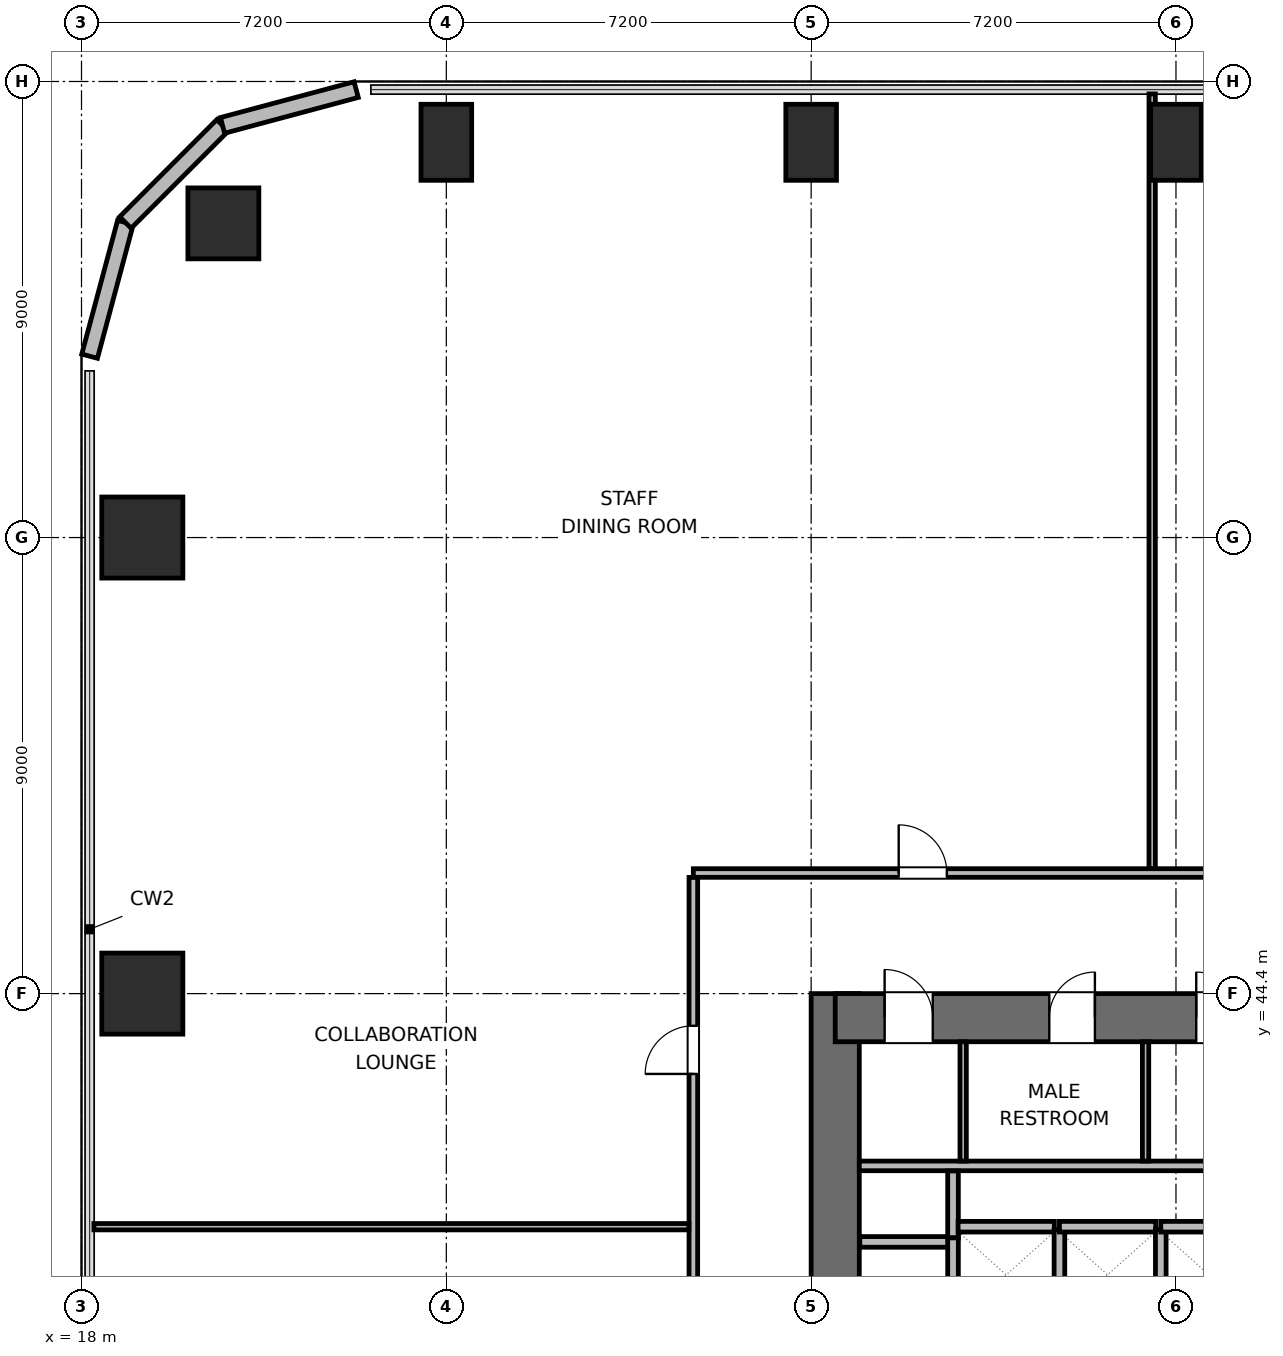
"""IFC4 building model, lengths in metres.
Left out: names, types, materials, properties, quantities, classifications, styles, units other than length and angle.
Written with IfcOpenShell. Run it as: python <this file> out.ifc"""

import sys

from ifc_helpers import new_model, si_unit, direction, frame, frame_2d, origin, origin_2d, place, context, subcontext, project, spatial, rectangle, circle, extrude, element, fill, save


model = new_model("IFC4")
c1 = context("Model", 3, precision=1e-05, world=origin(), true_north=direction((0.0, 1.0)))
c2 = subcontext(c1, "Body", "Model", "MODEL_VIEW")
j1 = project(units=[si_unit("LENGTHUNIT", "METRE"), si_unit("PLANEANGLEUNIT", "RADIAN")], contexts=[c1])
p1 = place(None, origin())
s1 = spatial("IfcSite", under=j1, at=p1, CompositionType="ELEMENT")
p2 = place(p1, origin())
s2 = spatial("IfcBuilding", under=s1, at=p2, CompositionType="ELEMENT")
p3 = place(p2, frame((0.0, 0.0, 41.1)))
s3 = spatial("IfcBuildingStorey", under=s2, at=p3, CompositionType="ELEMENT", Elevation=41.1)
p4 = place(p3, frame((32.875, 27.6, 0.0), z_axis=(0.0, 0.0, 1.0), x_axis=(0.0, 1.0, 0.0)))
e1 = element("IfcWall", 1, at=p4, inside=s3, PredefinedType="SHEAR", context=c2, shape_type="SweptSolid", body=[
    extrude(rectangle(XDim=16.8, YDim=0.95, at=frame_2d((8.4, 0.0))), origin(), (0.0, 0.0, 1.0), 3.9),
])
p5 = place(p3, frame((32.875, 43.925, 0.0), z_axis=(0.0, 0.0, 1.0), x_axis=(1.0, 0.0, 0.0)))
e2 = element("IfcWall", 2, at=p5, inside=s3, PredefinedType="SHEAR", context=c2, shape_type="SweptSolid", body=[
    extrude(rectangle(XDim=9.05, YDim=0.95, at=frame_2d((4.525, 0.0))), origin(), (0.0, 0.0, 1.0), 3.9),
])
p6 = place(p5, frame((0.975, 0.0, 0.0)))
e3 = element("IfcOpeningElement", 3, at=p6, cuts=e2, PredefinedType="OPENING", context=c2, shape_type="SweptSolid", body=[
    extrude(rectangle(XDim=0.95, YDim=2.04, at=frame_2d((0.475, 1.02))), frame((0.0, 0.485, 0.0), z_axis=(0.0, -1.0, 0.0), x_axis=(1.0, 0.0, 0.0)), (0.0, 0.0, 1.0), 0.97),
])
p7 = place(p5, frame((4.225, 0.0, 0.0)))
e4 = element("IfcOpeningElement", 4, at=p7, cuts=e2, PredefinedType="OPENING", context=c2, shape_type="SweptSolid", body=[
    extrude(rectangle(XDim=0.9, YDim=2.02, at=frame_2d((0.45, 1.01))), frame((0.0, 0.485, 0.0), z_axis=(0.0, -1.0, 0.0), x_axis=(1.0, 0.0, 0.0)), (0.0, 0.0, 1.0), 0.97),
])
p8 = place(p5, frame((7.125, 0.0, 0.0)))
e5 = element("IfcOpeningElement", 5, at=p8, cuts=e2, PredefinedType="OPENING", context=c2, shape_type="SweptSolid", body=[
    extrude(rectangle(XDim=0.9, YDim=2.02, at=frame_2d((0.45, 1.01))), frame((0.0, 0.485, 0.0), z_axis=(0.0, -1.0, 0.0), x_axis=(1.0, 0.0, 0.0)), (0.0, 0.0, 1.0), 0.97),
])
p9 = place(p3, frame((20.8, 59.6, 0.0), z_axis=(0.0, 0.0, 1.0), x_axis=(1.0, 0.0, 0.0)))
e6 = element("IfcColumn", 6, at=p9, inside=s3, PredefinedType="COLUMN", context=c2, shape_type="SweptSolid", body=[
    extrude(circle(Radius=0.7, at=origin_2d()), origin(), (0.0, 0.0, 1.0), 3.9),
])
for number, where, z_axis, x_axis in (
    (7, (25.2, 61.2, 0.0), (0.0, 0.0, 1.0), (1.0, 0.0, 0.0)),
    (8, (32.4, 61.2, 0.0), (0.0, 0.0, 1.0), (1.0, 0.0, 0.0)),
    (9, (39.6, 61.2, 0.0), (0.0, 0.0, 1.0), (1.0, 0.0, 0.0)),
):
    element("IfcColumn", number, at=place(p3, frame(where, z_axis=z_axis, x_axis=x_axis)), inside=s3, PredefinedType="COLUMN", context=c2, shape_type="SweptSolid", body=[
        extrude(rectangle(XDim=1.0, YDim=1.5, at=origin_2d()), origin(), (0.0, 0.0, 1.0), 3.9),
    ])
for number, where, z_axis, x_axis in (
    (10, (19.2, 44.4, 0.0), (0.0, 0.0, 1.0), (1.0, 0.0, 0.0)),
    (11, (19.2, 53.4, 0.0), (0.0, 0.0, 1.0), (1.0, 0.0, 0.0)),
):
    element("IfcColumn", number, at=place(p3, frame(where, z_axis=z_axis, x_axis=x_axis)), inside=s3, PredefinedType="COLUMN", context=c2, shape_type="SweptSolid", body=[
        extrude(rectangle(XDim=1.6, YDim=1.6, at=origin_2d()), origin(), (0.0, 0.0, 1.0), 3.9),
    ])
p10 = place(p3, frame((18.16, 56.979, 0.0), z_axis=(0.0, 0.0, 1.0), x_axis=(0.25869736047, 0.965958423373, 0.0)))
e12 = element("IfcWall", 12, at=p10, inside=s3, PredefinedType="SOLIDWALL", context=c2, shape_type="SweptSolid", body=[
    extrude(rectangle(XDim=2.731, YDim=0.32, at=frame_2d((1.366, 0.0))), origin(), (0.0, 0.0, 1.0), 3.64),
])
p11 = place(p3, frame((18.866, 59.617, 0.0), z_axis=(0.0, 0.0, 1.0), x_axis=(0.707106781187, 0.707106781187, 0.0)))
e13 = element("IfcWall", 13, at=p11, inside=s3, PredefinedType="SOLIDWALL", context=c2, shape_type="SweptSolid", body=[
    extrude(rectangle(XDim=2.71, YDim=0.32, at=frame_2d((1.355, 0.0))), origin(), (0.0, 0.0, 1.0), 3.64),
])
p12 = place(p3, frame((20.783, 61.533, 0.0), z_axis=(0.0, 0.0, 1.0), x_axis=(0.965964405026, 0.25867502435, 0.0)))
e14 = element("IfcWall", 14, at=p12, inside=s3, PredefinedType="SOLIDWALL", context=c2, shape_type="SweptSolid", body=[
    extrude(rectangle(XDim=2.731, YDim=0.32, at=frame_2d((1.366, 0.0))), origin(), (0.0, 0.0, 1.0), 3.64),
])
p13 = place(p3, frame((33.35, 41.0, 0.0), z_axis=(0.0, 0.0, 1.0), x_axis=(1.0, 0.0, 0.0)))
e15 = element("IfcWall", 15, at=p13, inside=s3, PredefinedType="PLUMBINGWALL", context=c2, shape_type="SweptSolid", body=[
    extrude(rectangle(XDim=8.1, YDim=0.19, at=frame_2d((4.05, 0.0))), origin(), (0.0, 0.0, 1.0), 3.64),
])
for number, where, z_axis, x_axis in (
    (16, (35.4, 41.095, 0.0), (0.0, 0.0, 1.0), (0.0, 1.0, 0.0)),
    (17, (39.0, 41.095, 0.0), (0.0, 0.0, 1.0), (0.0, 1.0, 0.0)),
):
    element("IfcWall", number, at=place(p3, frame(where, z_axis=z_axis, x_axis=x_axis)), inside=s3, PredefinedType="PARTITIONING", context=c2, shape_type="SweptSolid", body=[
        extrude(rectangle(XDim=2.355, YDim=0.125, at=frame_2d((1.177, 0.0))), origin(), (0.0, 0.0, 1.0), 3.64),
    ])
p14 = place(p3, frame((33.36, 39.5, 0.0), z_axis=(0.0, 0.0, 1.0), x_axis=(1.0, 0.0, 0.0)))
e18 = element("IfcWall", 18, at=p14, inside=s3, PredefinedType="PARTITIONING", context=c2, shape_type="SweptSolid", body=[
    extrude(rectangle(XDim=1.86, YDim=0.21, at=frame_2d((0.93, 0.0))), origin(), (0.0, 0.0, 1.0), 3.64),
])
p15 = place(p3, frame((35.2, 39.58, 0.0), z_axis=(0.0, 0.0, 1.0), x_axis=(0.0, 1.0, 0.0)))
e19 = element("IfcWall", 19, at=p15, inside=s3, PredefinedType="PARTITIONING", context=c2, shape_type="SweptSolid", body=[
    extrude(rectangle(XDim=1.32, YDim=0.21, at=frame_2d((0.66, 0.0))), origin(), (0.0, 0.0, 1.0), 3.64),
])
p16 = place(p3, frame((35.3, 39.8, 0.0), z_axis=(0.0, 0.0, 1.0), x_axis=(1.0, 0.0, 0.0)))
e20 = element("IfcWall", 20, at=p16, inside=s3, PredefinedType="PARTITIONING", context=c2, shape_type="SweptSolid", body=[
    extrude(rectangle(XDim=1.9, YDim=0.21, at=frame_2d((0.95, 0.0))), origin(), (0.0, 0.0, 1.0), 3.64),
])
p17 = place(p3, frame((35.2, 37.96, 0.0), z_axis=(0.0, 0.0, 1.0), x_axis=(0.0, 1.0, 0.0)))
e21 = element("IfcWall", 21, at=p17, inside=s3, PredefinedType="PARTITIONING", context=c2, shape_type="SweptSolid", body=[
    extrude(rectangle(XDim=1.62, YDim=0.21, at=frame_2d((0.81, 0.0))), origin(), (0.0, 0.0, 1.0), 3.64),
])
p18 = place(p3, frame((37.3, 37.96, 0.0), z_axis=(0.0, 0.0, 1.0), x_axis=(0.0, 1.0, 0.0)))
e22 = element("IfcWall", 22, at=p18, inside=s3, PredefinedType="PARTITIONING", context=c2, shape_type="SweptSolid", body=[
    extrude(rectangle(XDim=1.78, YDim=0.21, at=frame_2d((0.89, 0.0))), origin(), (0.0, 0.0, 1.0), 3.64),
])
p19 = place(p3, frame((37.3, 39.8, 0.0), z_axis=(0.0, 0.0, 1.0), x_axis=(1.0, 0.0, 0.0)))
e23 = element("IfcWall", 23, at=p19, inside=s3, PredefinedType="PARTITIONING", context=c2, shape_type="SweptSolid", body=[
    extrude(rectangle(XDim=1.9, YDim=0.21, at=frame_2d((0.95, 0.0))), origin(), (0.0, 0.0, 1.0), 3.64),
])
p20 = place(p3, frame((39.3, 37.96, 0.0), z_axis=(0.0, 0.0, 1.0), x_axis=(0.0, 1.0, 0.0)))
e24 = element("IfcWall", 24, at=p20, inside=s3, PredefinedType="PARTITIONING", context=c2, shape_type="SweptSolid", body=[
    extrude(rectangle(XDim=1.78, YDim=0.21, at=frame_2d((0.89, 0.0))), origin(), (0.0, 0.0, 1.0), 3.64),
])
p21 = place(p3, frame((39.3, 39.8, 0.0), z_axis=(0.0, 0.0, 1.0), x_axis=(1.0, 0.0, 0.0)))
e25 = element("IfcWall", 25, at=p21, inside=s3, PredefinedType="PARTITIONING", context=c2, shape_type="SweptSolid", body=[
    extrude(rectangle(XDim=1.9, YDim=0.21, at=frame_2d((0.95, 0.0))), origin(), (0.0, 0.0, 1.0), 3.64),
])
p22 = place(p3, frame((30.075, 46.78, 0.0), z_axis=(0.0, 0.0, 1.0), x_axis=(1.0, 0.0, 0.0)))
e26 = element("IfcWall", 26, at=p22, inside=s3, PredefinedType="PARTITIONING", context=c2, shape_type="SweptSolid", body=[
    extrude(rectangle(XDim=35.85, YDim=0.17, at=frame_2d((17.925, 0.0))), origin(), (0.0, 0.0, 1.0), 3.64),
])
p23 = place(p22, frame((4.053, 0.0, 0.0)))
e27 = element("IfcOpeningElement", 27, at=p23, cuts=e26, PredefinedType="OPENING", context=c2, shape_type="SweptSolid", body=[
    extrude(rectangle(XDim=0.95, YDim=2.04, at=frame_2d((0.475, 1.02))), frame((0.0, 0.095, 0.0), z_axis=(0.0, -1.0, 0.0), x_axis=(1.0, 0.0, 0.0)), (0.0, 0.0, 1.0), 0.19),
])
p24 = place(p22, frame((11.05, 0.0, 0.0)))
e28 = element("IfcOpeningElement", 28, at=p24, cuts=e26, PredefinedType="OPENING", context=c2, shape_type="SweptSolid", body=[
    extrude(rectangle(XDim=0.95, YDim=2.04, at=frame_2d((0.475, 1.02))), frame((0.0, 0.095, 0.0), z_axis=(0.0, -1.0, 0.0), x_axis=(1.0, 0.0, 0.0)), (0.0, 0.0, 1.0), 0.19),
])
p25 = place(p22, frame((16.55, 0.0, 0.0)))
e29 = element("IfcOpeningElement", 29, at=p25, cuts=e26, PredefinedType="OPENING", context=c2, shape_type="SweptSolid", body=[
    extrude(rectangle(XDim=0.95, YDim=2.04, at=frame_2d((0.475, 1.02))), frame((0.0, 0.095, 0.0), z_axis=(0.0, -1.0, 0.0), x_axis=(1.0, 0.0, 0.0)), (0.0, 0.0, 1.0), 0.19),
])
p26 = place(p22, frame((20.82, 0.0, 0.0)))
e30 = element("IfcOpeningElement", 30, at=p26, cuts=e26, PredefinedType="OPENING", context=c2, shape_type="SweptSolid", body=[
    extrude(rectangle(XDim=0.95, YDim=2.04, at=frame_2d((0.475, 1.02))), frame((0.0, 0.095, 0.0), z_axis=(0.0, -1.0, 0.0), x_axis=(1.0, 0.0, 0.0)), (0.0, 0.0, 1.0), 0.19),
])
p27 = place(p22, frame((25.985, 0.0, 0.0)))
e31 = element("IfcOpeningElement", 31, at=p27, cuts=e26, PredefinedType="OPENING", context=c2, shape_type="SweptSolid", body=[
    extrude(rectangle(XDim=0.95, YDim=2.04, at=frame_2d((0.475, 1.02))), frame((0.0, 0.095, 0.0), z_axis=(0.0, -1.0, 0.0), x_axis=(1.0, 0.0, 0.0)), (0.0, 0.0, 1.0), 0.19),
])
p28 = place(p22, frame((32.643, 0.0, 0.0)))
e32 = element("IfcOpeningElement", 32, at=p28, cuts=e26, PredefinedType="OPENING", context=c2, shape_type="SweptSolid", body=[
    extrude(rectangle(XDim=0.95, YDim=2.04, at=frame_2d((0.475, 1.02))), frame((0.0, 0.095, 0.0), z_axis=(0.0, -1.0, 0.0), x_axis=(1.0, 0.0, 0.0)), (0.0, 0.0, 1.0), 0.19),
])
p29 = place(p3, frame((30.075, 25.307, 0.0), z_axis=(0.0, 0.0, 1.0), x_axis=(0.0, 1.0, 0.0)))
e33 = element("IfcWall", 33, at=p29, inside=s3, PredefinedType="PARTITIONING", context=c2, shape_type="SweptSolid", body=[
    extrude(rectangle(XDim=21.386, YDim=0.17, at=frame_2d((10.693, 0.0))), origin(), (0.0, 0.0, 1.0), 3.64),
])
p30 = place(p29, frame((3.528, 0.0, 0.0)))
e34 = element("IfcOpeningElement", 34, at=p30, cuts=e33, PredefinedType="OPENING", context=c2, shape_type="SweptSolid", body=[
    extrude(rectangle(XDim=0.95, YDim=2.04, at=frame_2d((0.475, 1.02))), frame((0.0, 0.095, 0.0), z_axis=(0.0, -1.0, 0.0), x_axis=(1.0, 0.0, 0.0)), (0.0, 0.0, 1.0), 0.19),
])
p31 = place(p29, frame((10.818, 0.0, 0.0)))
e35 = element("IfcOpeningElement", 35, at=p31, cuts=e33, PredefinedType="OPENING", context=c2, shape_type="SweptSolid", body=[
    extrude(rectangle(XDim=0.95, YDim=2.04, at=frame_2d((0.475, 1.02))), frame((0.0, 0.095, 0.0), z_axis=(0.0, -1.0, 0.0), x_axis=(1.0, 0.0, 0.0)), (0.0, 0.0, 1.0), 0.19),
])
p32 = place(p29, frame((17.508, 0.0, 0.0)))
e36 = element("IfcOpeningElement", 36, at=p32, cuts=e33, PredefinedType="OPENING", context=c2, shape_type="SweptSolid", body=[
    extrude(rectangle(XDim=0.95, YDim=2.04, at=frame_2d((0.475, 1.02))), frame((0.0, 0.095, 0.0), z_axis=(0.0, -1.0, 0.0), x_axis=(1.0, 0.0, 0.0)), (0.0, 0.0, 1.0), 0.19),
])
p33 = place(p3, frame((39.13, 46.867, 0.0), z_axis=(0.0, 0.0, 1.0), x_axis=(0.0, 1.0, 0.0)))
e37 = element("IfcWall", 37, at=p33, inside=s3, PredefinedType="PARTITIONING", context=c2, shape_type="SweptSolid", body=[
    extrude(rectangle(XDim=15.288, YDim=0.125, at=frame_2d((7.644, 0.0))), origin(), (0.0, 0.0, 1.0), 3.64),
])
p34 = place(p3, frame((18.245, 39.8, 0.0), z_axis=(0.0, 0.0, 1.0), x_axis=(1.0, 0.0, 0.0)))
e38 = element("IfcWall", 38, at=p34, inside=s3, PredefinedType="PARTITIONING", context=c2, shape_type="SweptSolid", body=[
    extrude(rectangle(XDim=11.743, YDim=0.125, at=frame_2d((5.872, 0.0))), origin(), (0.0, 0.0, 1.0), 3.64),
])
p35 = place(p6, origin())
e39 = element("IfcDoor", 39, at=p35, inside=s3, OperationType="SINGLE_SWING_LEFT", PredefinedType="DOOR", context=c2, shape_type="SweptSolid", body=[
    extrude(rectangle(XDim=0.95, YDim=2.04, at=frame_2d((0.475, 1.02))), frame((0.0, 0.025, 0.0), z_axis=(0.0, -1.0, 0.0), x_axis=(1.0, 0.0, 0.0)), (0.0, 0.0, 1.0), 0.05),
])
fill(e3, e39)
p36 = place(p7, origin())
e40 = element("IfcDoor", 40, at=p36, inside=s3, OperationType="SINGLE_SWING_RIGHT", PredefinedType="DOOR", context=c2, shape_type="SweptSolid", body=[
    extrude(rectangle(XDim=0.9, YDim=2.02, at=frame_2d((0.45, 1.01))), frame((0.0, 0.025, 0.0), z_axis=(0.0, -1.0, 0.0), x_axis=(1.0, 0.0, 0.0)), (0.0, 0.0, 1.0), 0.05),
])
fill(e4, e40)
p37 = place(p8, origin())
e41 = element("IfcDoor", 41, at=p37, inside=s3, OperationType="SINGLE_SWING_LEFT", PredefinedType="DOOR", context=c2, shape_type="SweptSolid", body=[
    extrude(rectangle(XDim=0.9, YDim=2.02, at=frame_2d((0.45, 1.01))), frame((0.0, 0.025, 0.0), z_axis=(0.0, -1.0, 0.0), x_axis=(1.0, 0.0, 0.0)), (0.0, 0.0, 1.0), 0.05),
])
fill(e5, e41)
p38 = place(p23, origin())
e42 = element("IfcDoor", 42, at=p38, inside=s3, OperationType="SINGLE_SWING_LEFT", PredefinedType="DOOR", context=c2, shape_type="SweptSolid", body=[
    extrude(rectangle(XDim=0.95, YDim=2.04, at=frame_2d((0.475, 1.02))), frame((0.0, 0.025, 0.0), z_axis=(0.0, -1.0, 0.0), x_axis=(1.0, 0.0, 0.0)), (0.0, 0.0, 1.0), 0.05),
])
fill(e27, e42)
p39 = place(p32, origin())
e43 = element("IfcDoor", 43, at=p39, inside=s3, OperationType="SINGLE_SWING_LEFT", PredefinedType="DOOR", context=c2, shape_type="SweptSolid", body=[
    extrude(rectangle(XDim=0.95, YDim=2.04, at=frame_2d((0.475, 1.02))), frame((0.0, 0.025, 0.0), z_axis=(0.0, -1.0, 0.0), x_axis=(1.0, 0.0, 0.0)), (0.0, 0.0, 1.0), 0.05),
])
fill(e36, e43)
save(model, sys.argv[1])
